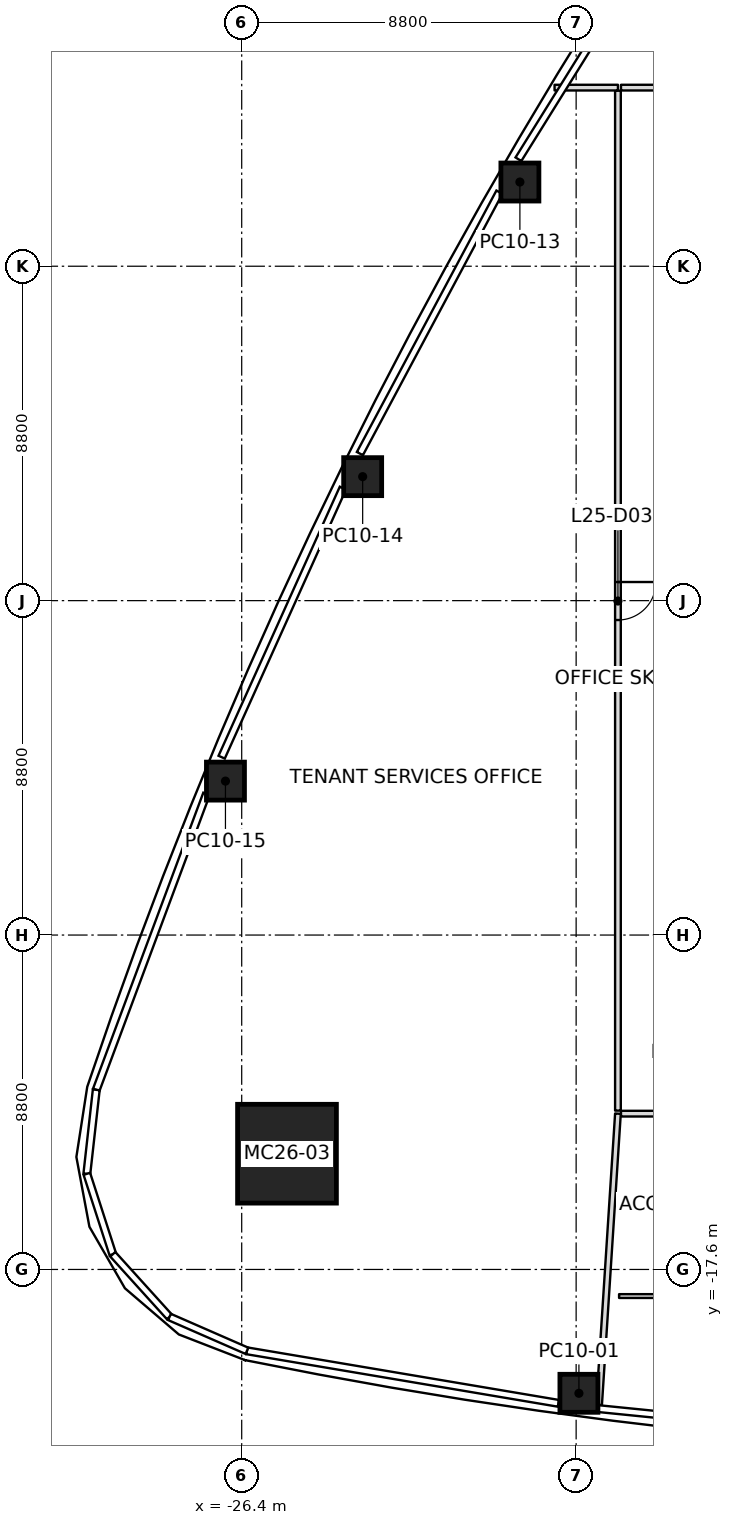
"""IFC4 building model, lengths in metres.
Left out: names, types, materials, properties, quantities, classifications, styles, units other than length and angle.
Written with IfcOpenShell. Run it as: python <this file> out.ifc"""

import sys

from ifc_helpers import new_model, si_unit, direction, frame, frame_2d, origin, origin_2d, place, context, subcontext, project, spatial, rectangle, extrude, clip, halfspace, element, fill, save


model = new_model("IFC4")
c1 = context("Model", 3, precision=1e-05, world=origin(), true_north=direction((0.0, 1.0)))
c2 = subcontext(c1, "Body", "Model", "MODEL_VIEW")
j1 = project(units=[si_unit("LENGTHUNIT", "METRE"), si_unit("PLANEANGLEUNIT", "RADIAN")], contexts=[c1])
p1 = place(None, origin())
s1 = spatial("IfcSite", under=j1, at=p1, CompositionType="ELEMENT")
p2 = place(p1, origin())
s2 = spatial("IfcBuilding", under=s1, at=p2, CompositionType="ELEMENT")
p3 = place(p2, frame((0.0, 0.0, 118.6)))
s3 = spatial("IfcBuildingStorey", under=s2, at=p3, CompositionType="ELEMENT", Elevation=118.6)
p4 = place(p3, frame((-25.208, -14.554, 0.0), z_axis=(0.015663232601, 0.009052127932, 0.999836347671), x_axis=(0.999877324048, -0.000141802981, -0.015662590699)))
e1 = element("IfcColumn", 1, at=p4, inside=s3, PredefinedType="COLUMN", context=c2, shape_type="SweptSolid", body=[
    clip(clip(extrude(rectangle(XDim=2.6, YDim=2.6, at=origin_2d()), origin(), (0.0, 0.0, 1.0), 7.201), halfspace(frame((0.0, 0.0, 0.003)), True)), halfspace(frame((0.0, 0.0, 7.188)), False)),
])
p5 = place(p3, frame((-17.527, -20.859, 0.0), z_axis=(0.009866769044, 0.005831904727, 0.999934315721), x_axis=(-0.991039650142, 0.133264324033, 0.009001765775)))
e2 = element("IfcColumn", 2, at=p5, inside=s3, PredefinedType="COLUMN", context=c2, shape_type="SweptSolid", body=[
    clip(clip(extrude(rectangle(XDim=1.0, YDim=1.0, at=origin_2d()), origin(), (0.0, 0.0, 1.0), 7.2), halfspace(frame((0.0, 0.0, 0.002)), True)), halfspace(frame((0.0, 0.0, 7.197)), False)),
])
p6 = place(p3, frame((-19.08, 11.016, 0.0), z_axis=(0.005493091126, -0.003153441202, 0.999979940678), x_axis=(0.499992456431, 0.866029758883, -1.5530513e-05)))
e3 = element("IfcColumn", 3, at=p6, inside=s3, PredefinedType="COLUMN", context=c2, shape_type="SweptSolid", body=[
    clip(clip(extrude(rectangle(XDim=1.0, YDim=1.0, at=origin_2d()), origin(), (0.0, 0.0, 1.0), 7.2), halfspace(frame((0.0, 0.0, 0.002)), True)), halfspace(frame((0.0, 0.0, 7.198)), False)),
])
p7 = place(p3, frame((-23.217, 3.263, 0.0), z_axis=(0.007832652687, 0.001152857971, 0.999968659744), x_axis=(0.441061618566, 0.897465594469, -0.004489473538)))
e4 = element("IfcColumn", 4, at=p7, inside=s3, PredefinedType="COLUMN", context=c2, shape_type="SweptSolid", body=[
    clip(clip(extrude(rectangle(XDim=1.0, YDim=1.0, at=origin_2d()), origin(), (0.0, 0.0, 1.0), 7.2), halfspace(frame((0.0, 0.0, 0.002)), True)), halfspace(frame((0.0, 0.0, 7.198)), False)),
])
p8 = place(p3, frame((-26.828, -4.749, 0.0), z_axis=(0.009968489877, 0.005628467073, 0.999934472637), x_axis=(0.380162196242, 0.924876088416, -0.008995867091)))
e5 = element("IfcColumn", 5, at=p8, inside=s3, PredefinedType="COLUMN", context=c2, shape_type="SweptSolid", body=[
    clip(clip(extrude(rectangle(XDim=1.0, YDim=1.0, at=origin_2d()), origin(), (0.0, 0.0, 1.0), 7.2), halfspace(frame((0.0, 0.0, 0.002)), True)), halfspace(frame((0.0, 0.0, 7.197)), False)),
])
p9 = place(p3, frame((-16.5, 13.5, 0.0), z_axis=(0.0, 0.0, 1.0), x_axis=(-1.0, 0.0, 0.0)))
e6 = element("IfcWall", 6, at=p9, inside=s3, PredefinedType="PARTITIONING", context=c2, shape_type="SweptSolid", body=[
    extrude(rectangle(XDim=1.667, YDim=0.15, at=frame_2d((0.834, 0.0))), origin(), (0.0, 0.0, 1.0), 6.434),
])
p10 = place(p3, frame((-16.5, -13.5, 0.0), z_axis=(0.0, 0.0, 1.0), x_axis=(-0.064628390645, -0.997909400258, 0.0)))
e7 = element("IfcWall", 7, at=p10, inside=s3, PredefinedType="PARTITIONING", context=c2, shape_type="SweptSolid", body=[
    extrude(rectangle(XDim=7.68, YDim=0.15, at=frame_2d((3.84, 0.0))), origin(), (0.0, 0.0, 1.0), 6.434),
])
p11 = place(p3, frame((-16.5, 13.42, 0.0), z_axis=(0.0, 0.0, 1.0), x_axis=(0.0, -1.0, 0.0)))
e8 = element("IfcWall", 8, at=p11, inside=s3, PredefinedType="PARTITIONING", context=c2, shape_type="SweptSolid", body=[
    extrude(rectangle(XDim=26.84, YDim=0.15, at=frame_2d((13.42, 0.0))), origin(), (0.0, 0.0, 1.0), 6.366),
])
p12 = place(p11, frame((12.93, 0.0, 0.0)))
e9 = element("IfcOpeningElement", 9, at=p12, cuts=e8, PredefinedType="OPENING", context=c2, shape_type="SweptSolid", body=[
    extrude(rectangle(XDim=1.0, YDim=2.1, at=frame_2d((0.5, 1.05))), frame((0.0, 0.075, 0.0), z_axis=(0.0, -1.0, 0.0), x_axis=(1.0, 0.0, 0.0)), (0.0, 0.0, 1.0), 0.15),
])
p13 = place(p3, frame((-16.42, -13.5, 0.0), z_axis=(0.0, 0.0, 1.0), x_axis=(1.0, 0.0, 0.0)))
e10 = element("IfcWall", 10, at=p13, inside=s3, PredefinedType="PARTITIONING", context=c2, shape_type="SweptSolid", body=[
    extrude(rectangle(XDim=32.84, YDim=0.15, at=frame_2d((16.42, 0.0))), origin(), (0.0, 0.0, 1.0), 6.443),
])
p14 = place(p13, frame((1.52, 0.0, 0.0)))
e11 = element("IfcOpeningElement", 11, at=p14, cuts=e10, PredefinedType="OPENING", context=c2, shape_type="SweptSolid", body=[
    extrude(rectangle(XDim=1.0, YDim=2.1, at=frame_2d((0.5, 1.05))), frame((0.0, 0.075, 0.0), z_axis=(0.0, -1.0, 0.0), x_axis=(1.0, 0.0, 0.0)), (0.0, 0.0, 1.0), 0.15),
])
p15 = place(p13, frame((9.07, 0.0, 0.0)))
e12 = element("IfcOpeningElement", 12, at=p15, cuts=e10, PredefinedType="OPENING", context=c2, shape_type="SweptSolid", body=[
    extrude(rectangle(XDim=1.0, YDim=2.1, at=frame_2d((0.5, 1.05))), frame((0.0, 0.075, 0.0), z_axis=(0.0, -1.0, 0.0), x_axis=(1.0, 0.0, 0.0)), (0.0, 0.0, 1.0), 0.15),
])
p16 = place(p13, frame((23.02, 0.0, 0.0)))
e13 = element("IfcOpeningElement", 13, at=p16, cuts=e10, PredefinedType="OPENING", context=c2, shape_type="SweptSolid", body=[
    extrude(rectangle(XDim=1.8, YDim=2.1, at=frame_2d((0.9, 1.05))), frame((0.0, 0.075, 0.0), z_axis=(0.0, -1.0, 0.0), x_axis=(1.0, 0.0, 0.0)), (0.0, 0.0, 1.0), 0.15),
])
p17 = place(p3, frame((16.42, 13.5, 0.0), z_axis=(0.0, 0.0, 1.0), x_axis=(-1.0, 0.0, 0.0)))
e14 = element("IfcWall", 14, at=p17, inside=s3, PredefinedType="PARTITIONING", context=c2, shape_type="SweptSolid", body=[
    extrude(rectangle(XDim=32.84, YDim=0.15, at=frame_2d((16.42, 0.0))), origin(), (0.0, 0.0, 1.0), 6.297),
])
p18 = place(p17, frame((8.91, 0.0, 0.0)))
e15 = element("IfcOpeningElement", 15, at=p18, cuts=e14, PredefinedType="OPENING", context=c2, shape_type="SweptSolid", body=[
    extrude(rectangle(XDim=1.0, YDim=2.1, at=frame_2d((0.5, 1.05))), frame((0.0, 0.075, 0.0), z_axis=(0.0, -1.0, 0.0), x_axis=(1.0, 0.0, 0.0)), (0.0, 0.0, 1.0), 0.15),
])
p19 = place(p17, frame((25.43, 0.0, 0.0)))
e16 = element("IfcOpeningElement", 16, at=p19, cuts=e14, PredefinedType="OPENING", context=c2, shape_type="SweptSolid", body=[
    extrude(rectangle(XDim=1.0, YDim=2.1, at=frame_2d((0.5, 1.05))), frame((0.0, 0.075, 0.0), z_axis=(0.0, -1.0, 0.0), x_axis=(1.0, 0.0, 0.0)), (0.0, 0.0, 1.0), 0.15),
])
p20 = place(p3, frame((-12.3, -18.3, 0.0), z_axis=(0.0, 0.0, 1.0), x_axis=(-1.0, 0.0, 0.0)))
e17 = element("IfcWall", 17, at=p20, inside=s3, PredefinedType="PARTITIONING", context=c2, shape_type="SweptSolid", body=[
    extrude(rectangle(XDim=4.17, YDim=0.1, at=frame_2d((2.085, 0.0))), origin(), (0.0, 0.0, 1.0), 6.5),
])
p21 = place(p12, origin())
e18 = element("IfcDoor", 18, at=p21, inside=s3, OperationType="SINGLE_SWING_LEFT", PredefinedType="DOOR", context=c2, shape_type="SweptSolid", body=[
    extrude(rectangle(XDim=1.0, YDim=2.1, at=frame_2d((0.5, 1.05))), frame((0.0, 0.025, 0.0), z_axis=(0.0, -1.0, 0.0), x_axis=(1.0, 0.0, 0.0)), (0.0, 0.0, 1.0), 0.05),
])
fill(e9, e18)
save(model, sys.argv[1])
